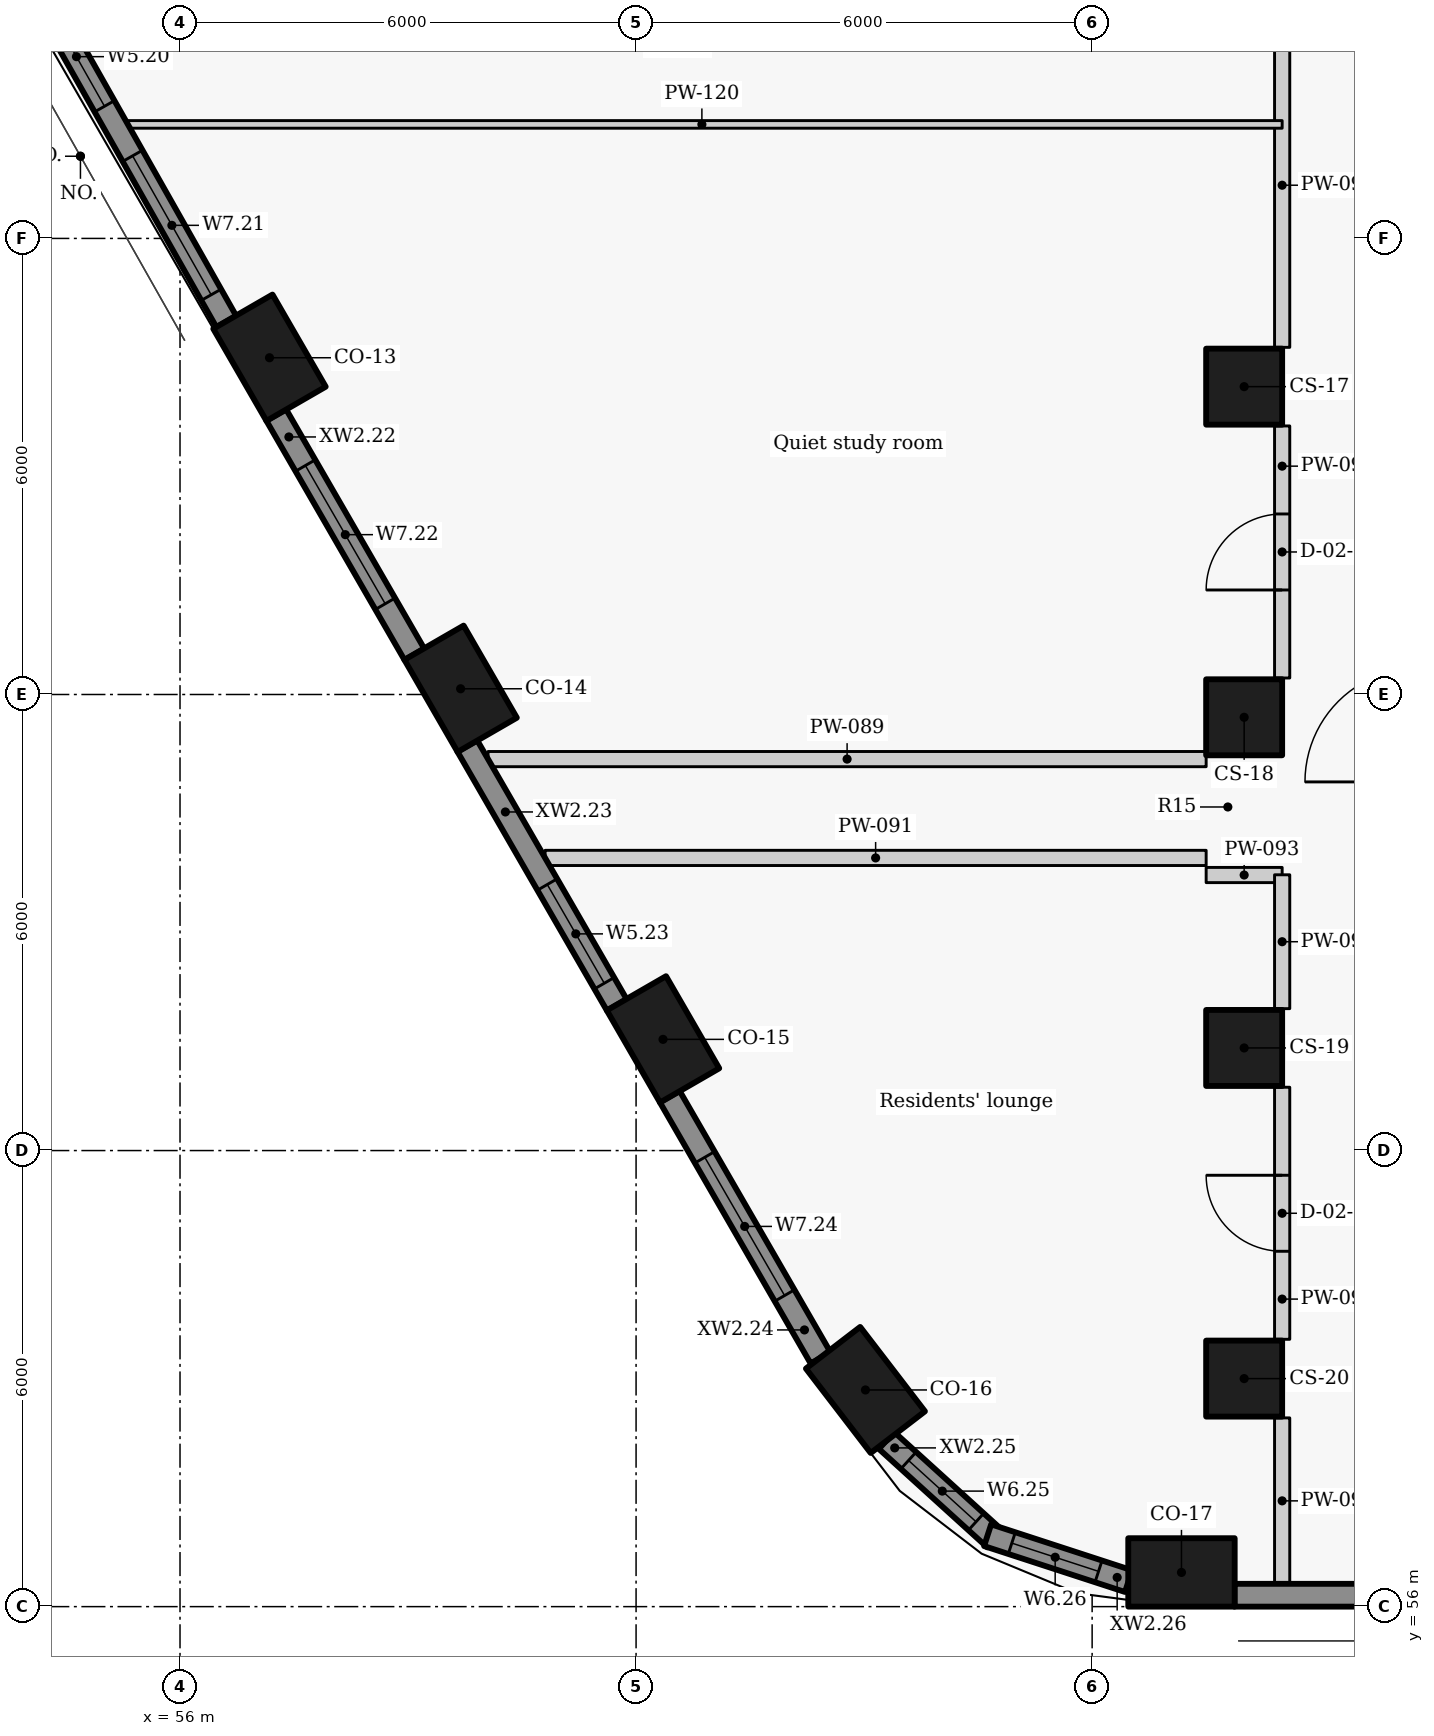
"""IFC4 building model, lengths in metres.
Left out: names, types, materials, properties, quantities, classifications, styles, units other than length and angle.
Written with IfcOpenShell. Run it as: python <this file> out.ifc"""

import sys

from ifc_helpers import new_model, si_unit, direction, frame, frame_2d, origin, origin_2d, place, context, subcontext, project, spatial, rectangle, extrude, element, fill, save


model = new_model("IFC4")
c1 = context("Model", 3, precision=1e-05, world=origin(), true_north=direction((0.0, 1.0)))
c2 = subcontext(c1, "Body", "Model", "MODEL_VIEW")
j1 = project(units=[si_unit("LENGTHUNIT", "METRE"), si_unit("PLANEANGLEUNIT", "RADIAN")], contexts=[c1])
p1 = place(None, origin())
s1 = spatial("IfcSite", under=j1, at=p1, CompositionType="ELEMENT")
p2 = place(p1, origin())
s2 = spatial("IfcBuilding", under=s1, at=p2, CompositionType="ELEMENT")
p3 = place(p2, frame((0.0, 0.0, 77.7)))
s3 = spatial("IfcBuildingStorey", under=s2, at=p3, CompositionType="ELEMENT", Elevation=77.7)
for number, where, z_axis, x_axis in (
    (1, (57.177, 72.43, 0.0), (0.0, 0.0, 1.0), (0.5, -0.866, 0.0)),
    (2, (59.692, 68.075, 0.0), (0.0, 0.0, 1.0), (0.5, -0.866, 0.0)),
    (3, (62.354, 63.463, 0.0), (0.0, 0.0, 1.0), (0.5, -0.866, 0.0)),
    (4, (65.018, 58.851, 0.0), (0.0, 0.0, 1.0), (0.609, -0.793, 0.0)),
    (5, (69.175, 56.45, 0.0), (0.0, 0.0, 1.0), (1.0, 0.0, 0.0)),
):
    element("IfcColumn", number, at=place(p3, frame(where, z_axis=z_axis, x_axis=x_axis)), inside=s3, PredefinedType="COLUMN", context=c2, shape_type="SweptSolid", body=[
        extrude(rectangle(XDim=1.4, YDim=0.9, at=origin_2d()), origin(), (0.0, 0.0, 1.0), 3.3),
    ])
for number, where, z_axis, x_axis in (
    (6, (70.0, 72.05, 0.0), (0.0, 0.0, 1.0), (0.0, -1.0, 0.0)),
    (7, (70.0, 67.7, 0.0), (0.0, 0.0, 1.0), (0.0, -1.0, 0.0)),
    (8, (70.0, 63.35, 0.0), (0.0, 0.0, 1.0), (0.0, -1.0, 0.0)),
    (9, (70.0, 59.0, 0.0), (0.0, 0.0, 1.0), (0.0, -1.0, 0.0)),
):
    element("IfcColumn", number, at=place(p3, frame(where, z_axis=z_axis, x_axis=x_axis)), inside=s3, PredefinedType="COLUMN", context=c2, shape_type="SweptSolid", body=[
        extrude(rectangle(XDim=1.0, YDim=1.0, at=origin_2d()), origin(), (0.0, 0.0, 1.0), 3.3),
    ])
p4 = place(p3, frame((53.814, 77.847, 0.0), z_axis=(0.0, 0.0, 1.0), x_axis=(0.492456858874, -0.870336855561, 0.0)))
e10 = element("IfcWall", 10, at=p4, inside=s3, PredefinedType="SOLIDWALL", context=c2, shape_type="SweptSolid", body=[
    extrude(rectangle(XDim=5.677, YDim=0.3, at=frame_2d((2.838, 0.0))), origin(), (0.0, 0.0, 1.0), 2.425),
])
p5 = place(p4, frame((0.922, 0.0, 0.9)))
e11 = element("IfcOpeningElement", 11, at=p5, cuts=e10, PredefinedType="OPENING", context=c2, shape_type="SweptSolid", body=[
    extrude(rectangle(XDim=1.5, YDim=1.1, at=frame_2d((0.75, 0.55))), frame((0.0, 0.16, 0.0), z_axis=(0.0, -1.0, 0.0), x_axis=(1.0, 0.0, 0.0)), (0.0, 0.0, 1.0), 0.32),
])
p6 = place(p4, frame((3.172, 0.0, 0.9)))
e12 = element("IfcOpeningElement", 12, at=p6, cuts=e10, PredefinedType="OPENING", context=c2, shape_type="SweptSolid", body=[
    extrude(rectangle(XDim=2.1, YDim=1.1, at=frame_2d((1.05, 0.55))), frame((0.0, 0.16, 0.0), z_axis=(0.0, -1.0, 0.0), x_axis=(1.0, 0.0, 0.0)), (0.0, 0.0, 1.0), 0.32),
])
p7 = place(p3, frame((57.265, 71.677, 0.0), z_axis=(0.0, 0.0, 1.0), x_axis=(0.500009139881, -0.866020126807, 0.0)))
e13 = element("IfcWall", 13, at=p7, inside=s3, PredefinedType="SOLIDWALL", context=c2, shape_type="SweptSolid", body=[
    extrude(rectangle(XDim=3.637, YDim=0.3, at=frame_2d((1.818, 0.0))), origin(), (0.0, 0.0, 1.0), 2.425),
])
p8 = place(p7, frame((0.768, 0.0, 0.9)))
e14 = element("IfcOpeningElement", 14, at=p8, cuts=e13, PredefinedType="OPENING", context=c2, shape_type="SweptSolid", body=[
    extrude(rectangle(XDim=2.1, YDim=1.1, at=frame_2d((1.05, 0.55))), frame((0.0, 0.16, 0.0), z_axis=(0.0, -1.0, 0.0), x_axis=(1.0, 0.0, 0.0)), (0.0, 0.0, 1.0), 0.32),
])
p9 = place(p3, frame((59.78, 67.323, 0.0), z_axis=(0.0, 0.0, 1.0), x_axis=(0.499957037901, -0.866050206543, 0.0)))
e15 = element("IfcWall", 15, at=p9, inside=s3, PredefinedType="SOLIDWALL", context=c2, shape_type="SweptSolid", body=[
    extrude(rectangle(XDim=3.934, YDim=0.3, at=frame_2d((1.967, 0.0))), origin(), (0.0, 0.0, 1.0), 2.425),
])
p10 = place(p9, frame((2.104, 0.0, 0.9)))
e16 = element("IfcOpeningElement", 16, at=p10, cuts=e15, PredefinedType="OPENING", context=c2, shape_type="SweptSolid", body=[
    extrude(rectangle(XDim=1.5, YDim=1.1, at=frame_2d((0.75, 0.55))), frame((0.0, 0.16, 0.0), z_axis=(0.0, -1.0, 0.0), x_axis=(1.0, 0.0, 0.0)), (0.0, 0.0, 1.0), 0.32),
])
p11 = place(p3, frame((62.443, 62.71, 0.0), z_axis=(0.0, 0.0, 1.0), x_axis=(0.500043828347, -0.866000097998, 0.0)))
e17 = element("IfcWall", 17, at=p11, inside=s3, PredefinedType="SOLIDWALL", context=c2, shape_type="SweptSolid", body=[
    extrude(rectangle(XDim=3.968, YDim=0.3, at=frame_2d((1.984, 0.0))), origin(), (0.0, 0.0, 1.0), 2.425),
])
p12 = place(p11, frame((0.922, 0.0, 0.9)))
e18 = element("IfcOpeningElement", 18, at=p12, cuts=e17, PredefinedType="OPENING", context=c2, shape_type="SweptSolid", body=[
    extrude(rectangle(XDim=2.1, YDim=1.1, at=frame_2d((1.05, 0.55))), frame((0.0, 0.16, 0.0), z_axis=(0.0, -1.0, 0.0), x_axis=(1.0, 0.0, 0.0)), (0.0, 0.0, 1.0), 0.32),
])
p13 = place(p3, frame((65.295, 58.186, 0.0), z_axis=(0.0, 0.0, 1.0), x_axis=(0.740421367382, -0.672142989791, 0.0)))
e19 = element("IfcWall", 19, at=p13, inside=s3, PredefinedType="SOLIDWALL", context=c2, shape_type="SweptSolid", body=[
    extrude(rectangle(XDim=1.927, YDim=0.3, at=frame_2d((0.964, 0.0))), origin(), (0.0, 0.0, 1.0), 2.425),
])
p14 = place(p13, frame((0.391, 0.0, 0.9)))
e20 = element("IfcOpeningElement", 20, at=p14, cuts=e19, PredefinedType="OPENING", context=c2, shape_type="SweptSolid", body=[
    extrude(rectangle(XDim=1.2, YDim=1.1, at=frame_2d((0.6, 0.55))), frame((0.0, 0.16, 0.0), z_axis=(0.0, -1.0, 0.0), x_axis=(1.0, 0.0, 0.0)), (0.0, 0.0, 1.0), 0.32),
])
p15 = place(p3, frame((66.625, 56.939, 0.0), z_axis=(0.0, 0.0, 1.0), x_axis=(0.950777961763, -0.309872985958, 0.0)))
e21 = element("IfcWall", 21, at=p15, inside=s3, PredefinedType="SOLIDWALL", context=c2, shape_type="SweptSolid", body=[
    extrude(rectangle(XDim=1.95, YDim=0.3, at=frame_2d((0.975, 0.0))), origin(), (0.0, 0.0, 1.0), 2.425),
])
p16 = place(p15, frame((0.335, 0.0, 0.9)))
e22 = element("IfcOpeningElement", 22, at=p16, cuts=e21, PredefinedType="OPENING", context=c2, shape_type="SweptSolid", body=[
    extrude(rectangle(XDim=1.2, YDim=1.1, at=frame_2d((0.6, 0.55))), frame((0.0, 0.16, 0.0), z_axis=(0.0, -1.0, 0.0), x_axis=(1.0, 0.0, 0.0)), (0.0, 0.0, 1.0), 0.32),
])
p17 = place(p3, frame((69.871, 56.15, 0.0), z_axis=(0.0, 0.0, 1.0), x_axis=(1.0, 0.0, 0.0)))
e23 = element("IfcWall", 23, at=p17, inside=s3, PredefinedType="SOLIDWALL", context=c2, shape_type="SweptSolid", body=[
    extrude(rectangle(XDim=19.94, YDim=0.3, at=frame_2d((9.97, 0.0))), origin(), (0.0, 0.0, 1.0), 2.425),
])
p18 = place(p3, frame((60.052, 67.15, 0.0), z_axis=(0.0, 0.0, 1.0), x_axis=(1.0, 0.0, 0.0)))
e24 = element("IfcWall", 24, at=p18, inside=s3, PredefinedType="PARTITIONING", context=c2, shape_type="SweptSolid", body=[
    extrude(rectangle(XDim=9.448, YDim=0.2, at=frame_2d((4.724, 0.0))), origin(), (0.0, 0.0, 1.0), 2.405),
])
p19 = place(p3, frame((60.803, 65.85, 0.0), z_axis=(0.0, 0.0, 1.0), x_axis=(1.0, 0.0, 0.0)))
e25 = element("IfcWall", 25, at=p19, inside=s3, PredefinedType="PARTITIONING", context=c2, shape_type="SweptSolid", body=[
    extrude(rectangle(XDim=8.697, YDim=0.2, at=frame_2d((4.349, 0.0))), origin(), (0.0, 0.0, 1.0), 2.405),
])
p20 = place(p3, frame((69.5, 65.625, 0.0), z_axis=(0.0, 0.0, 1.0), x_axis=(1.0, 0.0, 0.0)))
e26 = element("IfcWall", 26, at=p20, inside=s3, PredefinedType="PARTITIONING", context=c2, shape_type="SweptSolid", body=[
    extrude(rectangle(XDim=1.0, YDim=0.2, at=frame_2d((0.5, 0.0))), origin(), (0.0, 0.0, 1.0), 2.505),
])
p21 = place(p3, frame((70.5, 56.3, 0.0), z_axis=(0.0, 0.0, 1.0), x_axis=(0.0, 1.0, 0.0)))
e27 = element("IfcWall", 27, at=p21, inside=s3, PredefinedType="PARTITIONING", context=c2, shape_type="SweptSolid", body=[
    extrude(rectangle(XDim=2.183, YDim=0.2, at=frame_2d((1.091, 0.0))), origin(), (0.0, 0.0, 1.0), 3.025),
])
p22 = place(p3, frame((70.5, 59.517, 0.0), z_axis=(0.0, 0.0, 1.0), x_axis=(0.0, 1.0, 0.0)))
e28 = element("IfcWall", 28, at=p22, inside=s3, PredefinedType="PARTITIONING", context=c2, shape_type="SweptSolid", body=[
    extrude(rectangle(XDim=3.316, YDim=0.2, at=frame_2d((1.658, 0.0))), origin(), (0.0, 0.0, 1.0), 3.025),
])
p23 = place(p22, frame((1.158, 0.0, 0.0)))
e29 = element("IfcOpeningElement", 29, at=p23, cuts=e28, PredefinedType="OPENING", context=c2, shape_type="SweptSolid", body=[
    extrude(rectangle(XDim=1.0, YDim=2.1, at=frame_2d((0.5, 1.05))), frame((0.0, 0.11, 0.0), z_axis=(0.0, -1.0, 0.0), x_axis=(1.0, 0.0, 0.0)), (0.0, 0.0, 1.0), 0.22),
])
p24 = place(p3, frame((70.5, 63.867, 0.0), z_axis=(0.0, 0.0, 1.0), x_axis=(0.0, 1.0, 0.0)))
e30 = element("IfcWall", 30, at=p24, inside=s3, PredefinedType="PARTITIONING", context=c2, shape_type="SweptSolid", body=[
    extrude(rectangle(XDim=1.761, YDim=0.2, at=frame_2d((0.88, 0.0))), origin(), (0.0, 0.0, 1.0), 3.025),
])
p25 = place(p3, frame((70.5, 68.217, 0.0), z_axis=(0.0, 0.0, 1.0), x_axis=(0.0, 1.0, 0.0)))
e31 = element("IfcWall", 31, at=p25, inside=s3, PredefinedType="PARTITIONING", context=c2, shape_type="SweptSolid", body=[
    extrude(rectangle(XDim=3.316, YDim=0.2, at=frame_2d((1.658, 0.0))), origin(), (0.0, 0.0, 1.0), 3.025),
])
p26 = place(p25, frame((1.158, 0.0, 0.0)))
e32 = element("IfcOpeningElement", 32, at=p26, cuts=e31, PredefinedType="OPENING", context=c2, shape_type="SweptSolid", body=[
    extrude(rectangle(XDim=1.0, YDim=2.1, at=frame_2d((0.5, 1.05))), frame((0.0, 0.11, 0.0), z_axis=(0.0, -1.0, 0.0), x_axis=(1.0, 0.0, 0.0)), (0.0, 0.0, 1.0), 0.22),
])
p27 = place(p3, frame((70.5, 72.567, 0.0), z_axis=(0.0, 0.0, 1.0), x_axis=(0.0, 1.0, 0.0)))
e33 = element("IfcWall", 33, at=p27, inside=s3, PredefinedType="PARTITIONING", context=c2, shape_type="SweptSolid", body=[
    extrude(rectangle(XDim=4.266, YDim=0.2, at=frame_2d((2.133, 0.0))), origin(), (0.0, 0.0, 1.0), 3.025),
])
p28 = place(p3, frame((55.232, 75.5, 0.0), z_axis=(0.0, 0.0, 1.0), x_axis=(1.0, 0.0, 0.0)))
e34 = element("IfcWall", 34, at=p28, inside=s3, PredefinedType="PARTITIONING", context=c2, shape_type="SweptSolid", body=[
    extrude(rectangle(XDim=15.268, YDim=0.1, at=frame_2d((7.634, 0.0))), origin(), (0.0, 0.0, 1.0), 2.405),
])
p29 = place(p5, origin())
e35 = element("IfcWindow", 35, at=p29, inside=s3, PartitioningType="SINGLE_PANEL", PredefinedType="WINDOW", context=c2, shape_type="SweptSolid", body=[
    extrude(rectangle(XDim=1.5, YDim=1.1, at=frame_2d((0.75, 0.55))), frame((0.0, 0.03, 0.0), z_axis=(0.0, -1.0, 0.0), x_axis=(1.0, 0.0, 0.0)), (0.0, 0.0, 1.0), 0.06),
])
fill(e11, e35)
p30 = place(p6, origin())
e36 = element("IfcWindow", 36, at=p30, inside=s3, PartitioningType="SINGLE_PANEL", PredefinedType="WINDOW", context=c2, shape_type="SweptSolid", body=[
    extrude(rectangle(XDim=2.1, YDim=1.1, at=frame_2d((1.05, 0.55))), frame((0.0, 0.03, 0.0), z_axis=(0.0, -1.0, 0.0), x_axis=(1.0, 0.0, 0.0)), (0.0, 0.0, 1.0), 0.06),
])
fill(e12, e36)
p31 = place(p8, origin())
e37 = element("IfcWindow", 37, at=p31, inside=s3, PartitioningType="SINGLE_PANEL", PredefinedType="WINDOW", context=c2, shape_type="SweptSolid", body=[
    extrude(rectangle(XDim=2.1, YDim=1.1, at=frame_2d((1.05, 0.55))), frame((0.0, 0.03, 0.0), z_axis=(0.0, -1.0, 0.0), x_axis=(1.0, 0.0, 0.0)), (0.0, 0.0, 1.0), 0.06),
])
fill(e14, e37)
p32 = place(p10, origin())
e38 = element("IfcWindow", 38, at=p32, inside=s3, PartitioningType="SINGLE_PANEL", PredefinedType="WINDOW", context=c2, shape_type="SweptSolid", body=[
    extrude(rectangle(XDim=1.5, YDim=1.1, at=frame_2d((0.75, 0.55))), frame((0.0, 0.03, 0.0), z_axis=(0.0, -1.0, 0.0), x_axis=(1.0, 0.0, 0.0)), (0.0, 0.0, 1.0), 0.06),
])
fill(e16, e38)
p33 = place(p12, origin())
e39 = element("IfcWindow", 39, at=p33, inside=s3, PartitioningType="SINGLE_PANEL", PredefinedType="WINDOW", context=c2, shape_type="SweptSolid", body=[
    extrude(rectangle(XDim=2.1, YDim=1.1, at=frame_2d((1.05, 0.55))), frame((0.0, 0.03, 0.0), z_axis=(0.0, -1.0, 0.0), x_axis=(1.0, 0.0, 0.0)), (0.0, 0.0, 1.0), 0.06),
])
fill(e18, e39)
p34 = place(p14, origin())
e40 = element("IfcWindow", 40, at=p34, inside=s3, PartitioningType="SINGLE_PANEL", PredefinedType="WINDOW", context=c2, shape_type="SweptSolid", body=[
    extrude(rectangle(XDim=1.2, YDim=1.1, at=frame_2d((0.6, 0.55))), frame((0.0, 0.03, 0.0), z_axis=(0.0, -1.0, 0.0), x_axis=(1.0, 0.0, 0.0)), (0.0, 0.0, 1.0), 0.06),
])
fill(e20, e40)
p35 = place(p16, origin())
e41 = element("IfcWindow", 41, at=p35, inside=s3, PartitioningType="SINGLE_PANEL", PredefinedType="WINDOW", context=c2, shape_type="SweptSolid", body=[
    extrude(rectangle(XDim=1.2, YDim=1.1, at=frame_2d((0.6, 0.55))), frame((0.0, 0.03, 0.0), z_axis=(0.0, -1.0, 0.0), x_axis=(1.0, 0.0, 0.0)), (0.0, 0.0, 1.0), 0.06),
])
fill(e22, e41)
p36 = place(p23, origin())
e42 = element("IfcDoor", 42, at=p36, inside=s3, OperationType="SINGLE_SWING_RIGHT", PredefinedType="DOOR", context=c2, shape_type="SweptSolid", body=[
    extrude(rectangle(XDim=1.0, YDim=2.1, at=frame_2d((0.5, 1.05))), frame((0.0, 0.025, 0.0), z_axis=(0.0, -1.0, 0.0), x_axis=(1.0, 0.0, 0.0)), (0.0, 0.0, 1.0), 0.05),
])
fill(e29, e42)
p37 = place(p26, origin())
e43 = element("IfcDoor", 43, at=p37, inside=s3, OperationType="SINGLE_SWING_LEFT", PredefinedType="DOOR", context=c2, shape_type="SweptSolid", body=[
    extrude(rectangle(XDim=1.0, YDim=2.1, at=frame_2d((0.5, 1.05))), frame((0.0, 0.025, 0.0), z_axis=(0.0, -1.0, 0.0), x_axis=(1.0, 0.0, 0.0)), (0.0, 0.0, 1.0), 0.05),
])
fill(e32, e43)
save(model, sys.argv[1])
